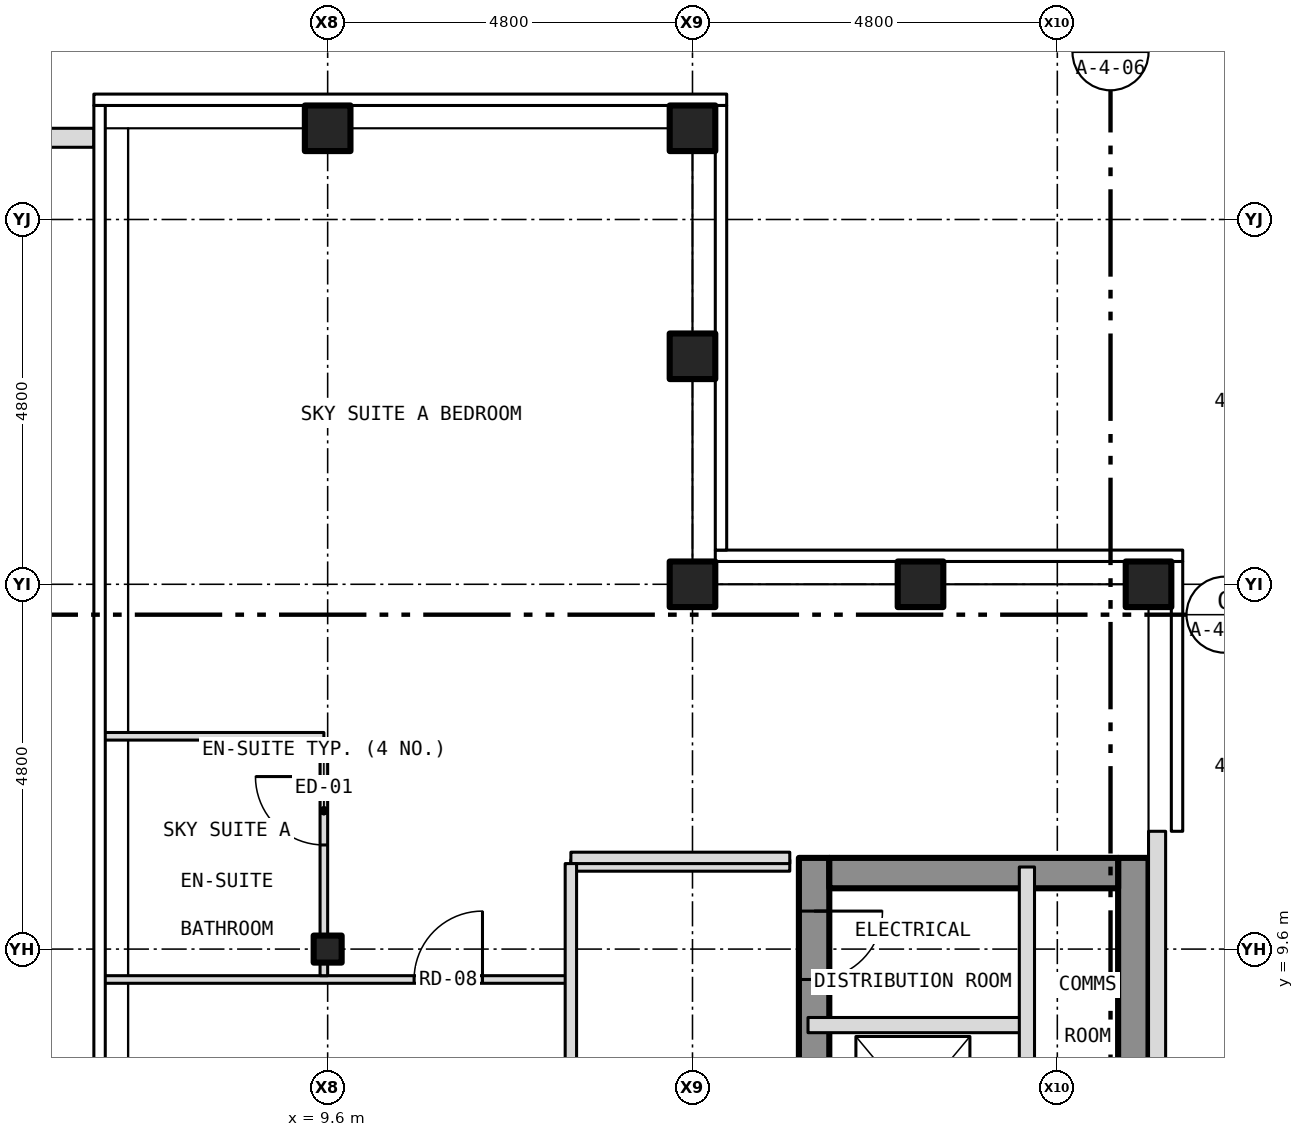
"""IFC4 building model, lengths in metres.
Left out: names, types, materials, properties, quantities, classifications, styles, units other than length and angle.
Written with IfcOpenShell. Run it as: python <this file> out.ifc"""

import sys

from ifc_helpers import new_model, si_unit, direction, frame, frame_2d, origin, origin_2d, place, context, subcontext, project, spatial, rectangle, hollow_rectangle, i_section, extrude, element, fill, save


model = new_model("IFC4")
c1 = context("Model", 3, precision=1e-05, world=origin(), true_north=direction((0.0, 1.0)))
c2 = subcontext(c1, "Body", "Model", "MODEL_VIEW")
j1 = project(units=[si_unit("LENGTHUNIT", "METRE"), si_unit("PLANEANGLEUNIT", "RADIAN")], contexts=[c1])
p1 = place(None, origin())
s1 = spatial("IfcSite", under=j1, at=p1, CompositionType="ELEMENT")
p2 = place(p1, origin())
s2 = spatial("IfcBuilding", under=s1, at=p2, CompositionType="ELEMENT")
p3 = place(p2, frame((0.0, 0.0, 265.5)))
s3 = spatial("IfcBuildingStorey", under=s2, at=p3, CompositionType="ELEMENT", Elevation=265.5)
for number, where, z_axis, x_axis in (
    (1, (9.6, 20.4, -0.25), (0.0, 0.0, 1.0), (1.0, 0.0, 0.0)),
    (2, (14.4, 20.4, -0.25), (0.0, 0.0, 1.0), (1.0, 0.0, 0.0)),
    (3, (20.4, 14.4, -0.25), (0.0, 0.0, 1.0), (1.0, 0.0, 0.0)),
    (4, (14.4, 14.4, -0.25), (0.0, 0.0, 1.0), (1.0, 0.0, 0.0)),
    (5, (14.4, 17.4, -0.25), (0.0, 0.0, 1.0), (1.0, 0.0, 0.0)),
    (6, (17.4, 14.4, -0.25), (0.0, 0.0, 1.0), (1.0, 0.0, 0.0)),
):
    element("IfcColumn", number, at=place(p3, frame(where, z_axis=z_axis, x_axis=x_axis)), inside=s3, PredefinedType="COLUMN", context=c2, shape_type="SweptSolid", body=[
        extrude(hollow_rectangle(XDim=0.6, YDim=0.6, WallThickness=0.03, at=origin_2d()), origin(), (0.0, 0.0, 1.0), 3.6),
    ])
p4 = place(p3, frame((9.6, 9.6, -0.25), z_axis=(0.0, 0.0, 1.0), x_axis=(1.0, 0.0, 0.0)))
e7 = element("IfcColumn", 7, at=p4, inside=s3, PredefinedType="COLUMN", context=c2, shape_type="SweptSolid", body=[
    extrude(i_section(OverallWidth=0.368, OverallDepth=0.356, WebThickness=0.011, FlangeThickness=0.018, at=origin_2d()), origin(), (0.0, 0.0, 1.0), 3.6),
])
p5 = place(p3, frame((16.0, -10.8, 0.0), z_axis=(0.0, 0.0, 1.0), x_axis=(0.0, 1.0, 0.0)))
e8 = element("IfcWall", 8, at=p5, inside=s3, PredefinedType="SHEAR", context=c2, shape_type="SweptSolid", body=[
    extrude(rectangle(XDim=21.6, YDim=0.4, at=frame_2d((10.8, 0.0))), origin(), (0.0, 0.0, 1.0), 3.25),
])
p6 = place(p5, frame((9.4, 0.0, 0.0)))
e9 = element("IfcOpeningElement", 9, at=p6, cuts=e8, PredefinedType="OPENING", context=c2, shape_type="SweptSolid", body=[
    extrude(rectangle(XDim=1.1, YDim=2.1, at=frame_2d((0.55, 1.05))), frame((0.0, 0.212, 0.0), z_axis=(0.0, -1.0, 0.0), x_axis=(1.0, 0.0, 0.0)), (0.0, 0.0, 1.0), 0.424),
])
p7 = place(p5, frame((11.5, 0.0, 0.0)))
e10 = element("IfcOpeningElement", 10, at=p7, cuts=e8, PredefinedType="OPENING", context=c2, shape_type="SweptSolid", body=[
    extrude(rectangle(XDim=1.1, YDim=2.1, at=frame_2d((0.55, 1.05))), frame((0.0, 0.212, 0.0), z_axis=(0.0, -1.0, 0.0), x_axis=(1.0, 0.0, 0.0)), (0.0, 0.0, 1.0), 0.424),
])
p8 = place(p5, frame((13.6, 0.0, 0.0)))
e11 = element("IfcOpeningElement", 11, at=p8, cuts=e8, PredefinedType="OPENING", context=c2, shape_type="SweptSolid", body=[
    extrude(rectangle(XDim=1.1, YDim=2.1, at=frame_2d((0.55, 1.05))), frame((0.0, 0.212, 0.0), z_axis=(0.0, -1.0, 0.0), x_axis=(1.0, 0.0, 0.0)), (0.0, 0.0, 1.0), 0.424),
])
p9 = place(p5, frame((15.7, 0.0, 0.0)))
e12 = element("IfcOpeningElement", 12, at=p9, cuts=e8, PredefinedType="OPENING", context=c2, shape_type="SweptSolid", body=[
    extrude(rectangle(XDim=1.1, YDim=2.1, at=frame_2d((0.55, 1.05))), frame((0.0, 0.212, 0.0), z_axis=(0.0, -1.0, 0.0), x_axis=(1.0, 0.0, 0.0)), (0.0, 0.0, 1.0), 0.424),
])
p10 = place(p5, frame((17.8, 0.0, 0.0)))
e13 = element("IfcOpeningElement", 13, at=p10, cuts=e8, PredefinedType="OPENING", context=c2, shape_type="SweptSolid", body=[
    extrude(rectangle(XDim=1.1, YDim=2.1, at=frame_2d((0.55, 1.05))), frame((0.0, 0.212, 0.0), z_axis=(0.0, -1.0, 0.0), x_axis=(1.0, 0.0, 0.0)), (0.0, 0.0, 1.0), 0.424),
])
p11 = place(p5, frame((5.642, 0.0, 0.0)))
e14 = element("IfcOpeningElement", 14, at=p11, cuts=e8, PredefinedType="OPENING", context=c2, shape_type="SweptSolid", body=[
    extrude(rectangle(XDim=1.1, YDim=2.1, at=frame_2d((0.55, 1.05))), frame((0.0, 0.212, 0.0), z_axis=(0.0, -1.0, 0.0), x_axis=(1.0, 0.0, 0.0)), (0.0, 0.0, 1.0), 0.424),
])
p12 = place(p5, frame((7.5, 0.0, 0.0)))
e15 = element("IfcOpeningElement", 15, at=p12, cuts=e8, PredefinedType="OPENING", context=c2, shape_type="SweptSolid", body=[
    extrude(rectangle(XDim=1.1, YDim=2.1, at=frame_2d((0.55, 1.05))), frame((0.0, 0.212, 0.0), z_axis=(0.0, -1.0, 0.0), x_axis=(1.0, 0.0, 0.0)), (0.0, 0.0, 1.0), 0.424),
])
p13 = place(p5, frame((20.0, 0.0, 0.0)))
e16 = element("IfcOpeningElement", 16, at=p13, cuts=e8, PredefinedType="OPENING", context=c2, shape_type="SweptSolid", body=[
    extrude(rectangle(XDim=0.9, YDim=2.1, at=frame_2d((0.45, 1.05))), frame((0.0, 0.212, 0.0), z_axis=(0.0, -1.0, 0.0), x_axis=(1.0, 0.0, 0.0)), (0.0, 0.0, 1.0), 0.424),
])
p14 = place(p3, frame((20.2, -10.8, 0.0), z_axis=(0.0, 0.0, 1.0), x_axis=(0.0, 1.0, 0.0)))
e17 = element("IfcWall", 17, at=p14, inside=s3, PredefinedType="SHEAR", context=c2, shape_type="SweptSolid", body=[
    extrude(rectangle(XDim=21.6, YDim=0.4, at=frame_2d((10.8, 0.0))), origin(), (0.0, 0.0, 1.0), 3.25),
])
p15 = place(p3, frame((16.2, 10.6, 0.0), z_axis=(0.0, 0.0, 1.0), x_axis=(1.0, 0.0, 0.0)))
e18 = element("IfcWall", 18, at=p15, inside=s3, PredefinedType="SHEAR", context=c2, shape_type="SweptSolid", body=[
    extrude(rectangle(XDim=3.8, YDim=0.4, at=frame_2d((1.9, 0.0))), origin(), (0.0, 0.0, 1.0), 3.25),
])
p16 = place(p3, frame((20.512, -11.15, 0.0), z_axis=(0.0, 0.0, 1.0), x_axis=(0.0, 1.0, 0.0)))
e19 = element("IfcWall", 19, at=p16, inside=s3, PredefinedType="SOLIDWALL", context=c2, shape_type="SweptSolid", body=[
    extrude(rectangle(XDim=22.3, YDim=0.225, at=frame_2d((11.15, 0.0))), origin(), (0.0, 0.0, 1.0), 3.5),
])
p17 = place(p16, frame((3.3, 0.0, 1.0)))
e20 = element("IfcOpeningElement", 20, at=p17, cuts=e19, PredefinedType="OPENING", context=c2, shape_type="SweptSolid", body=[
    extrude(rectangle(XDim=0.6, YDim=1.5, at=frame_2d((0.3, 0.75))), frame((0.0, 0.125, 0.0), z_axis=(0.0, -1.0, 0.0), x_axis=(1.0, 0.0, 0.0)), (0.0, 0.0, 1.0), 0.249),
])
p18 = place(p3, frame((6.524, 20.275, 0.0), z_axis=(0.0, 0.0, 1.0), x_axis=(-1.0, 0.0, 0.0)))
e21 = element("IfcWall", 21, at=p18, inside=s3, PredefinedType="PARAPET", context=c2, shape_type="SweptSolid", body=[
    extrude(rectangle(XDim=13.048, YDim=0.25, at=frame_2d((6.524, 0.0))), origin(), (0.0, 0.0, 1.0), 1.1),
])
p19 = place(p3, frame((15.92, 8.6, 0.0), z_axis=(0.0, 0.0, 1.0), x_axis=(1.0, 0.0, 0.0)))
e22 = element("IfcWall", 22, at=p19, inside=s3, PredefinedType="PARTITIONING", context=c2, shape_type="SweptSolid", body=[
    extrude(rectangle(XDim=2.88, YDim=0.2, at=frame_2d((1.44, 0.0))), origin(), (0.0, 0.0, 1.0), 3.25),
])
p20 = place(p3, frame((6.644, 9.2, 0.0), z_axis=(0.0, 0.0, 1.0), x_axis=(1.0, 0.0, 0.0)))
e23 = element("IfcWall", 23, at=p20, inside=s3, PredefinedType="PARTITIONING", context=c2, shape_type="SweptSolid", body=[
    extrude(rectangle(XDim=6.156, YDim=0.1, at=frame_2d((3.078, 0.0))), origin(), (0.0, 0.0, 1.0), 3.35),
])
p21 = place(p20, frame((4.093, 0.0, 0.0)))
e24 = element("IfcOpeningElement", 24, at=p21, cuts=e23, PredefinedType="OPENING", context=c2, shape_type="SweptSolid", body=[
    extrude(rectangle(XDim=0.9, YDim=2.1, at=frame_2d((0.45, 1.05))), frame((0.0, 0.062, 0.0), z_axis=(0.0, -1.0, 0.0), x_axis=(1.0, 0.0, 0.0)), (0.0, 0.0, 1.0), 0.124),
])
for number, where, z_axis, x_axis in (
    (25, (12.8, 10.7, 0.0), (0.0, 0.0, 1.0), (1.0, 0.0, 0.0)),
    (26, (12.8, 10.8, 0.0), (0.0, 0.0, 1.0), (1.0, 0.0, 0.0)),
):
    element("IfcWall", number, at=place(p3, frame(where, z_axis=z_axis, x_axis=x_axis)), inside=s3, PredefinedType="PARTITIONING", context=c2, shape_type="SweptSolid", body=[
        extrude(rectangle(XDim=2.88, YDim=0.15, at=frame_2d((1.44, 0.0))), origin(), (0.0, 0.0, 1.0), 3.35),
    ])
p22 = place(p3, frame((6.644, 12.4, 0.0), z_axis=(0.0, 0.0, 1.0), x_axis=(1.0, 0.0, 0.0)))
e27 = element("IfcWall", 27, at=p22, inside=s3, PredefinedType="PARTITIONING", context=c2, shape_type="SweptSolid", body=[
    extrude(rectangle(XDim=2.906, YDim=0.1, at=frame_2d((1.453, 0.0))), origin(), (0.0, 0.0, 1.0), 3.35),
])
p23 = place(p3, frame((9.55, 9.25, 0.0), z_axis=(0.0, 0.0, 1.0), x_axis=(0.0, 1.0, 0.0)))
e28 = element("IfcWall", 28, at=p23, inside=s3, PredefinedType="PARTITIONING", context=c2, shape_type="SweptSolid", body=[
    extrude(rectangle(XDim=0.534, YDim=0.1, at=frame_2d((0.267, 0.0))), origin(), (0.0, 0.0, 1.0), 3.35),
])
p24 = place(p3, frame((9.55, 9.784, 0.0), z_axis=(0.0, 0.0, 1.0), x_axis=(0.0, 1.0, 0.0)))
e29 = element("IfcWall", 29, at=p24, inside=s3, PredefinedType="PARTITIONING", context=c2, shape_type="SweptSolid", body=[
    extrude(rectangle(XDim=2.566, YDim=0.1, at=frame_2d((1.283, 0.0))), origin(), (0.0, 0.0, 1.0), 2.728),
])
p25 = place(p24, frame((1.186, 0.0, 0.0)))
e30 = element("IfcOpeningElement", 30, at=p25, cuts=e29, PredefinedType="OPENING", context=c2, shape_type="SweptSolid", body=[
    extrude(rectangle(XDim=0.9, YDim=2.1, at=frame_2d((0.45, 1.05))), frame((0.0, 0.062, 0.0), z_axis=(0.0, -1.0, 0.0), x_axis=(1.0, 0.0, 0.0)), (0.0, 0.0, 1.0), 0.124),
])
p26 = place(p3, frame((12.8, 2.4, 0.0), z_axis=(0.0, 0.0, 1.0), x_axis=(0.0, 1.0, 0.0)))
e31 = element("IfcWall", 31, at=p26, inside=s3, PredefinedType="PARTITIONING", context=c2, shape_type="SweptSolid", body=[
    extrude(rectangle(XDim=8.325, YDim=0.15, at=frame_2d((4.163, 0.0))), origin(), (0.0, 0.0, 1.0), 3.35),
])
p27 = place(p26, frame((2.89, 0.0, 0.0)))
e32 = element("IfcOpeningElement", 32, at=p27, cuts=e31, PredefinedType="OPENING", context=c2, shape_type="SweptSolid", body=[
    extrude(rectangle(XDim=0.9, YDim=2.1, at=frame_2d((0.45, 1.05))), frame((0.0, 0.087, 0.0), z_axis=(0.0, -1.0, 0.0), x_axis=(1.0, 0.0, 0.0)), (0.0, 0.0, 1.0), 0.174),
])
p28 = place(p3, frame((18.8, -1.8, 0.0), z_axis=(0.0, 0.0, 1.0), x_axis=(0.0, 1.0, 0.0)))
e33 = element("IfcWall", 33, at=p28, inside=s3, PredefinedType="PARTITIONING", context=c2, shape_type="SweptSolid", body=[
    extrude(rectangle(XDim=12.48, YDim=0.2, at=frame_2d((6.24, 0.0))), origin(), (0.0, 0.0, 1.0), 3.25),
])
p29 = place(p13, origin())
e34 = element("IfcDoor", 34, at=p29, inside=s3, OperationType="SINGLE_SWING_RIGHT", PredefinedType="DOOR", context=c2, shape_type="SweptSolid", body=[
    extrude(rectangle(XDim=0.9, YDim=2.1, at=frame_2d((0.45, 1.05))), frame((0.0, 0.025, 0.0), z_axis=(0.0, -1.0, 0.0), x_axis=(1.0, 0.0, 0.0)), (0.0, 0.0, 1.0), 0.05),
])
fill(e16, e34)
p30 = place(p21, origin())
e35 = element("IfcDoor", 35, at=p30, inside=s3, OperationType="SINGLE_SWING_RIGHT", PredefinedType="DOOR", context=c2, shape_type="SweptSolid", body=[
    extrude(rectangle(XDim=0.9, YDim=2.1, at=frame_2d((0.45, 1.05))), frame((0.0, 0.025, 0.0), z_axis=(0.0, -1.0, 0.0), x_axis=(1.0, 0.0, 0.0)), (0.0, 0.0, 1.0), 0.05),
])
fill(e24, e35)
p31 = place(p25, origin())
e36 = element("IfcDoor", 36, at=p31, inside=s3, OperationType="SINGLE_SWING_RIGHT", PredefinedType="DOOR", context=c2, shape_type="SweptSolid", body=[
    extrude(rectangle(XDim=0.9, YDim=2.1, at=frame_2d((0.45, 1.05))), frame((0.0, 0.025, 0.0), z_axis=(0.0, -1.0, 0.0), x_axis=(1.0, 0.0, 0.0)), (0.0, 0.0, 1.0), 0.05),
])
fill(e30, e36)
save(model, sys.argv[1])
